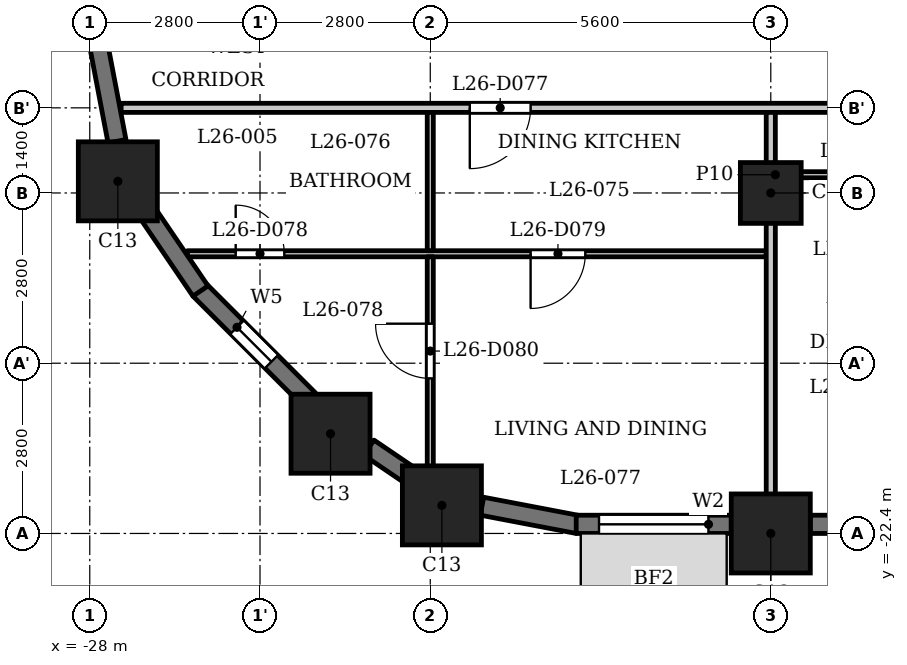
"""IFC4 building model, lengths in metres.
Left out: names, types, materials, properties, quantities, classifications, styles, units other than length and angle.
Written with IfcOpenShell. Run it as: python <this file> out.ifc"""

import sys

from ifc_helpers import new_model, si_unit, direction, frame, frame_2d, origin, origin_2d, place, context, subcontext, project, spatial, rectangle, extrude, element, fill, save


model = new_model("IFC4")
c1 = context("Model", 3, precision=1e-05, world=origin(), true_north=direction((0.0, 1.0)))
c2 = subcontext(c1, "Body", "Model", "MODEL_VIEW")
j1 = project(units=[si_unit("LENGTHUNIT", "METRE"), si_unit("PLANEANGLEUNIT", "RADIAN")], contexts=[c1])
p1 = place(None, origin())
s1 = spatial("IfcSite", under=j1, at=p1, CompositionType="ELEMENT")
p2 = place(p1, origin())
s2 = spatial("IfcBuilding", under=s1, at=p2, CompositionType="ELEMENT")
p3 = place(p2, frame((0.0, 0.0, 104.3)))
s3 = spatial("IfcBuildingStorey", under=s2, at=p3, CompositionType="ELEMENT", Elevation=104.3)
for number, where, z_axis, x_axis in (
    (1, (-22.209, -21.938, 0.0), (0.0, 0.0, 1.0), (1.0, 0.0, 0.0)),
    (2, (-16.8, -22.4, 0.0), (0.0, 0.0, 1.0), (1.0, 0.0, 0.0)),
    (3, (-27.538, -16.609, 0.0), (0.0, 0.0, 1.0), (1.0, 0.0, 0.0)),
    (4, (-24.04, -20.76, 0.0), (0.0, 0.0, 1.0), (1.0, 0.0, 0.0)),
):
    element("IfcColumn", number, at=place(p3, frame(where, z_axis=z_axis, x_axis=x_axis)), inside=s3, PredefinedType="COLUMN", context=c2, shape_type="SweptSolid", body=[
        extrude(rectangle(XDim=1.3, YDim=1.3, at=origin_2d()), origin(), (0.0, 0.0, 1.0), 3.5),
    ])
p4 = place(p3, frame((-16.8, -16.8, 0.0), z_axis=(0.0, 0.0, 1.0), x_axis=(1.0, 0.0, 0.0)))
e5 = element("IfcColumn", 5, at=p4, inside=s3, PredefinedType="COLUMN", context=c2, shape_type="SweptSolid", body=[
    extrude(rectangle(XDim=1.0, YDim=1.0, at=origin_2d()), origin(), (0.0, 0.0, 1.0), 3.5),
])
p5 = place(p3, frame((-26.197, -18.391, 0.0), z_axis=(0.0, 0.0, 1.0), x_axis=(0.707058908279, -0.707154650853, 0.0)))
e6 = element("IfcWall", 6, at=p5, inside=s3, PredefinedType="SOLIDWALL", context=c2, shape_type="SweptSolid", body=[
    extrude(rectangle(XDim=2.55, YDim=0.3, at=frame_2d((1.275, 0.0))), origin(), (0.0, 0.0, 1.0), 2.4),
])
p6 = place(p5, frame((0.875, 0.0, 0.6)))
e7 = element("IfcOpeningElement", 7, at=p6, cuts=e6, PredefinedType="OPENING", context=c2, shape_type="SweptSolid", body=[
    extrude(rectangle(XDim=0.8, YDim=1.55, at=frame_2d((0.4, 0.775))), frame((0.0, 0.16, 0.0), z_axis=(0.0, -1.0, 0.0), x_axis=(1.0, 0.0, 0.0)), (0.0, 0.0, 1.0), 0.32),
])
p7 = place(p3, frame((-23.41, -20.989, 0.0), z_axis=(0.0, 0.0, 1.0), x_axis=(0.827050703543, -0.562127328787, 0.0)))
e8 = element("IfcWall", 8, at=p7, inside=s3, PredefinedType="SOLIDWALL", context=c2, shape_type="SweptSolid", body=[
    extrude(rectangle(XDim=0.877, YDim=0.3, at=frame_2d((0.438, 0.0))), origin(), (0.0, 0.0, 1.0), 3.2),
])
p8 = place(p3, frame((-21.55, -21.952, 0.0), z_axis=(0.0, 0.0, 1.0), x_axis=(0.982278644094, -0.187426426519, 0.0)))
e9 = element("IfcWall", 9, at=p8, inside=s3, PredefinedType="SOLIDWALL", context=c2, shape_type="SweptSolid", body=[
    extrude(rectangle(XDim=1.606, YDim=0.3, at=frame_2d((0.803, 0.0))), origin(), (0.0, 0.0, 1.0), 2.4),
])
p9 = place(p3, frame((-20.0, -22.25, 0.0), z_axis=(0.0, 0.0, 1.0), x_axis=(1.0, 0.0, 0.0)))
e10 = element("IfcWall", 10, at=p9, inside=s3, PredefinedType="SOLIDWALL", context=c2, shape_type="SweptSolid", body=[
    extrude(rectangle(XDim=2.55, YDim=0.3, at=frame_2d((1.275, 0.0))), origin(), (0.0, 0.0, 1.0), 2.4),
])
p10 = place(p9, frame((0.375, 0.0, 0.9)))
e11 = element("IfcOpeningElement", 11, at=p10, cuts=e10, PredefinedType="OPENING", context=c2, shape_type="SweptSolid", body=[
    extrude(rectangle(XDim=1.8, YDim=1.25, at=frame_2d((0.9, 0.625))), frame((0.0, 0.16, 0.0), z_axis=(0.0, -1.0, 0.0), x_axis=(1.0, 0.0, 0.0)), (0.0, 0.0, 1.0), 0.32),
])
p11 = place(p3, frame((-16.15, -22.25, 0.0), z_axis=(0.0, 0.0, 1.0), x_axis=(1.0, 0.0, 0.0)))
e12 = element("IfcWall", 12, at=p11, inside=s3, PredefinedType="SOLIDWALL", context=c2, shape_type="SweptSolid", body=[
    extrude(rectangle(XDim=4.3, YDim=0.3, at=frame_2d((2.15, 0.0))), origin(), (0.0, 0.0, 1.0), 2.4),
])
p12 = place(p11, frame((0.337, 0.0, 0.6)))
e13 = element("IfcOpeningElement", 13, at=p12, cuts=e12, PredefinedType="OPENING", context=c2, shape_type="SweptSolid", body=[
    extrude(rectangle(XDim=1.2, YDim=1.55, at=frame_2d((0.6, 0.775))), frame((0.0, 0.16, 0.0), z_axis=(0.0, -1.0, 0.0), x_axis=(1.0, 0.0, 0.0)), (0.0, 0.0, 1.0), 0.32),
])
p13 = place(p11, frame((2.562, 0.0, 0.6)))
e14 = element("IfcOpeningElement", 14, at=p13, cuts=e12, PredefinedType="OPENING", context=c2, shape_type="SweptSolid", body=[
    extrude(rectangle(XDim=1.2, YDim=1.55, at=frame_2d((0.6, 0.775))), frame((0.0, 0.16, 0.0), z_axis=(0.0, -1.0, 0.0), x_axis=(1.0, 0.0, 0.0)), (0.0, 0.0, 1.0), 0.32),
])
for number, where, z_axis, x_axis in (
    (15, (-27.853, -14.372, 0.0), (0.0, 0.0, 1.0), (0.187, -0.982, 0.0)),
    (16, (-27.082, -17.084, 0.0), (0.0, 0.0, 1.0), (0.562, -0.827, 0.0)),
):
    element("IfcWall", number, at=place(p3, frame(where, z_axis=z_axis, x_axis=x_axis)), inside=s3, PredefinedType="SOLIDWALL", context=c2, shape_type="SweptSolid", body=[
        extrude(rectangle(XDim=1.606, YDim=0.3, at=frame_2d((0.803, 0.0))), origin(), (0.0, 0.0, 1.0), 2.4),
    ])
p14 = place(p3, frame((-26.394, -17.8, 0.0), z_axis=(0.0, 0.0, 1.0), x_axis=(1.0, 0.0, 0.0)))
e17 = element("IfcWall", 17, at=p14, inside=s3, PredefinedType="PARTITIONING", context=c2, shape_type="SweptSolid", body=[
    extrude(rectangle(XDim=9.519, YDim=0.1, at=frame_2d((4.76, 0.0))), origin(), (0.0, 0.0, 1.0), 3.2),
])
p15 = place(p14, frame((0.794, 0.0, 0.0)))
e18 = element("IfcOpeningElement", 18, at=p15, cuts=e17, PredefinedType="OPENING", context=c2, shape_type="SweptSolid", body=[
    extrude(rectangle(XDim=0.8, YDim=2.1, at=frame_2d((0.4, 1.05))), frame((0.0, 0.06, 0.0), z_axis=(0.0, -1.0, 0.0), x_axis=(1.0, 0.0, 0.0)), (0.0, 0.0, 1.0), 0.12),
])
p16 = place(p14, frame((5.644, 0.0, 0.0)))
e19 = element("IfcOpeningElement", 19, at=p16, cuts=e17, PredefinedType="OPENING", context=c2, shape_type="SweptSolid", body=[
    extrude(rectangle(XDim=0.9, YDim=2.1, at=frame_2d((0.45, 1.05))), frame((0.0, 0.06, 0.0), z_axis=(0.0, -1.0, 0.0), x_axis=(1.0, 0.0, 0.0)), (0.0, 0.0, 1.0), 0.12),
])
p17 = place(p3, frame((-16.725, -16.5, 0.0), z_axis=(0.0, 0.0, 1.0), x_axis=(1.0, 0.0, 0.0)))
e20 = element("IfcWall", 20, at=p17, inside=s3, PredefinedType="PARTITIONING", context=c2, shape_type="SweptSolid", body=[
    extrude(rectangle(XDim=33.45, YDim=0.1, at=frame_2d((16.725, 0.0))), origin(), (0.0, 0.0, 1.0), 3.2),
])
p18 = place(p17, frame((4.075, 0.0, 0.0)))
e21 = element("IfcOpeningElement", 21, at=p18, cuts=e20, PredefinedType="OPENING", context=c2, shape_type="SweptSolid", body=[
    extrude(rectangle(XDim=0.8, YDim=2.1, at=frame_2d((0.4, 1.05))), frame((0.0, 0.06, 0.0), z_axis=(0.0, -1.0, 0.0), x_axis=(1.0, 0.0, 0.0)), (0.0, 0.0, 1.0), 0.12),
])
p19 = place(p17, frame((1.075, 0.0, 0.0)))
e22 = element("IfcOpeningElement", 22, at=p19, cuts=e20, PredefinedType="OPENING", context=c2, shape_type="SweptSolid", body=[
    extrude(rectangle(XDim=0.9, YDim=2.1, at=frame_2d((0.45, 1.05))), frame((0.0, 0.06, 0.0), z_axis=(0.0, -1.0, 0.0), x_axis=(1.0, 0.0, 0.0)), (0.0, 0.0, 1.0), 0.12),
])
p20 = place(p17, frame((9.675, 0.0, 0.0)))
e23 = element("IfcOpeningElement", 23, at=p20, cuts=e20, PredefinedType="OPENING", context=c2, shape_type="SweptSolid", body=[
    extrude(rectangle(XDim=0.8, YDim=2.1, at=frame_2d((0.4, 1.05))), frame((0.0, 0.06, 0.0), z_axis=(0.0, -1.0, 0.0), x_axis=(1.0, 0.0, 0.0)), (0.0, 0.0, 1.0), 0.12),
])
p21 = place(p17, frame((7.675, 0.0, 0.0)))
e24 = element("IfcOpeningElement", 24, at=p21, cuts=e20, PredefinedType="OPENING", context=c2, shape_type="SweptSolid", body=[
    extrude(rectangle(XDim=0.9, YDim=2.1, at=frame_2d((0.45, 1.05))), frame((0.0, 0.06, 0.0), z_axis=(0.0, -1.0, 0.0), x_axis=(1.0, 0.0, 0.0)), (0.0, 0.0, 1.0), 0.12),
])
p22 = place(p17, frame((15.275, 0.0, 0.0)))
e25 = element("IfcOpeningElement", 25, at=p22, cuts=e20, PredefinedType="OPENING", context=c2, shape_type="SweptSolid", body=[
    extrude(rectangle(XDim=0.8, YDim=2.1, at=frame_2d((0.4, 1.05))), frame((0.0, 0.06, 0.0), z_axis=(0.0, -1.0, 0.0), x_axis=(1.0, 0.0, 0.0)), (0.0, 0.0, 1.0), 0.12),
])
p23 = place(p17, frame((11.775, 0.0, 0.0)))
e26 = element("IfcOpeningElement", 26, at=p23, cuts=e20, PredefinedType="OPENING", context=c2, shape_type="SweptSolid", body=[
    extrude(rectangle(XDim=0.9, YDim=2.1, at=frame_2d((0.45, 1.05))), frame((0.0, 0.06, 0.0), z_axis=(0.0, -1.0, 0.0), x_axis=(1.0, 0.0, 0.0)), (0.0, 0.0, 1.0), 0.12),
])
p24 = place(p17, frame((20.625, 0.0, 0.0)))
e27 = element("IfcOpeningElement", 27, at=p24, cuts=e20, PredefinedType="OPENING", context=c2, shape_type="SweptSolid", body=[
    extrude(rectangle(XDim=0.8, YDim=2.1, at=frame_2d((0.4, 1.05))), frame((0.0, 0.06, 0.0), z_axis=(0.0, -1.0, 0.0), x_axis=(1.0, 0.0, 0.0)), (0.0, 0.0, 1.0), 0.12),
])
p25 = place(p17, frame((18.375, 0.0, 0.0)))
e28 = element("IfcOpeningElement", 28, at=p25, cuts=e20, PredefinedType="OPENING", context=c2, shape_type="SweptSolid", body=[
    extrude(rectangle(XDim=0.9, YDim=2.1, at=frame_2d((0.45, 1.05))), frame((0.0, 0.06, 0.0), z_axis=(0.0, -1.0, 0.0), x_axis=(1.0, 0.0, 0.0)), (0.0, 0.0, 1.0), 0.12),
])
p26 = place(p17, frame((26.475, 0.0, 0.0)))
e29 = element("IfcOpeningElement", 29, at=p26, cuts=e20, PredefinedType="OPENING", context=c2, shape_type="SweptSolid", body=[
    extrude(rectangle(XDim=0.8, YDim=2.1, at=frame_2d((0.4, 1.05))), frame((0.0, 0.06, 0.0), z_axis=(0.0, -1.0, 0.0), x_axis=(1.0, 0.0, 0.0)), (0.0, 0.0, 1.0), 0.12),
])
p27 = place(p17, frame((23.225, 0.0, 0.0)))
e30 = element("IfcOpeningElement", 30, at=p27, cuts=e20, PredefinedType="OPENING", context=c2, shape_type="SweptSolid", body=[
    extrude(rectangle(XDim=0.9, YDim=2.1, at=frame_2d((0.45, 1.05))), frame((0.0, 0.06, 0.0), z_axis=(0.0, -1.0, 0.0), x_axis=(1.0, 0.0, 0.0)), (0.0, 0.0, 1.0), 0.12),
])
p28 = place(p17, frame((29.475, 0.0, 0.0)))
e31 = element("IfcOpeningElement", 31, at=p28, cuts=e20, PredefinedType="OPENING", context=c2, shape_type="SweptSolid", body=[
    extrude(rectangle(XDim=0.8, YDim=2.1, at=frame_2d((0.4, 1.05))), frame((0.0, 0.06, 0.0), z_axis=(0.0, -1.0, 0.0), x_axis=(1.0, 0.0, 0.0)), (0.0, 0.0, 1.0), 0.12),
])
p29 = place(p17, frame((31.825, 0.0, 0.0)))
e32 = element("IfcOpeningElement", 32, at=p29, cuts=e20, PredefinedType="OPENING", context=c2, shape_type="SweptSolid", body=[
    extrude(rectangle(XDim=0.9, YDim=2.1, at=frame_2d((0.45, 1.05))), frame((0.0, 0.06, 0.0), z_axis=(0.0, -1.0, 0.0), x_axis=(1.0, 0.0, 0.0)), (0.0, 0.0, 1.0), 0.12),
])
p30 = place(p3, frame((-27.484, -15.4, 0.0), z_axis=(0.0, 0.0, 1.0), x_axis=(1.0, 0.0, 0.0)))
e33 = element("IfcWall", 33, at=p30, inside=s3, PredefinedType="PARTITIONING", context=c2, shape_type="SweptSolid", body=[
    extrude(rectangle(XDim=12.559, YDim=0.15, at=frame_2d((6.279, 0.0))), origin(), (0.0, 0.0, 1.0), 3.2),
])
p31 = place(p30, frame((5.734, 0.0, 0.0)))
e34 = element("IfcOpeningElement", 34, at=p31, cuts=e33, PredefinedType="OPENING", context=c2, shape_type="SweptSolid", body=[
    extrude(rectangle(XDim=1.0, YDim=2.1, at=frame_2d((0.5, 1.05))), frame((0.0, 0.085, 0.0), z_axis=(0.0, -1.0, 0.0), x_axis=(1.0, 0.0, 0.0)), (0.0, 0.0, 1.0), 0.17),
])
p32 = place(p3, frame((-22.4, -21.72, 0.0), z_axis=(0.0, 0.0, 1.0), x_axis=(0.0, 1.0, 0.0)))
e35 = element("IfcWall", 35, at=p32, inside=s3, PredefinedType="PARTITIONING", context=c2, shape_type="SweptSolid", body=[
    extrude(rectangle(XDim=3.87, YDim=0.1, at=frame_2d((1.935, 0.0))), origin(), (0.0, 0.0, 1.0), 3.2),
])
p33 = place(p32, frame((1.87, 0.0, 0.0)))
e36 = element("IfcOpeningElement", 36, at=p33, cuts=e35, PredefinedType="OPENING", context=c2, shape_type="SweptSolid", body=[
    extrude(rectangle(XDim=0.9, YDim=2.1, at=frame_2d((0.45, 1.05))), frame((0.0, 0.06, 0.0), z_axis=(0.0, -1.0, 0.0), x_axis=(1.0, 0.0, 0.0)), (0.0, 0.0, 1.0), 0.12),
])
p34 = place(p3, frame((-22.4, -17.75, 0.0), z_axis=(0.0, 0.0, 1.0), x_axis=(0.0, 1.0, 0.0)))
e37 = element("IfcWall", 37, at=p34, inside=s3, PredefinedType="PARTITIONING", context=c2, shape_type="SweptSolid", body=[
    extrude(rectangle(XDim=2.275, YDim=0.1, at=frame_2d((1.137, 0.0))), origin(), (0.0, 0.0, 1.0), 3.2),
])
p35 = place(p3, frame((-16.8, -23.03, 0.0), z_axis=(0.0, 0.0, 1.0), x_axis=(0.0, 1.0, 0.0)))
e38 = element("IfcWall", 38, at=p35, inside=s3, PredefinedType="PARTITIONING", context=c2, shape_type="SweptSolid", body=[
    extrude(rectangle(XDim=7.555, YDim=0.15, at=frame_2d((3.777, 0.0))), origin(), (0.0, 0.0, 1.0), 3.2),
])
p36 = place(p31, origin())
e39 = element("IfcDoor", 39, at=p36, inside=s3, OperationType="SINGLE_SWING_LEFT", PredefinedType="DOOR", context=c2, shape_type="SweptSolid", body=[
    extrude(rectangle(XDim=1.0, YDim=2.1, at=frame_2d((0.5, 1.05))), frame((0.0, 0.025, 0.0), z_axis=(0.0, -1.0, 0.0), x_axis=(1.0, 0.0, 0.0)), (0.0, 0.0, 1.0), 0.05),
])
fill(e34, e39)
p37 = place(p15, origin())
e40 = element("IfcDoor", 40, at=p37, inside=s3, OperationType="SINGLE_SWING_RIGHT", PredefinedType="DOOR", context=c2, shape_type="SweptSolid", body=[
    extrude(rectangle(XDim=0.8, YDim=2.1, at=frame_2d((0.4, 1.05))), frame((0.0, 0.025, 0.0), z_axis=(0.0, -1.0, 0.0), x_axis=(1.0, 0.0, 0.0)), (0.0, 0.0, 1.0), 0.05),
])
fill(e18, e40)
p38 = place(p16, origin())
e41 = element("IfcDoor", 41, at=p38, inside=s3, OperationType="SINGLE_SWING_LEFT", PredefinedType="DOOR", context=c2, shape_type="SweptSolid", body=[
    extrude(rectangle(XDim=0.9, YDim=2.1, at=frame_2d((0.45, 1.05))), frame((0.0, 0.025, 0.0), z_axis=(0.0, -1.0, 0.0), x_axis=(1.0, 0.0, 0.0)), (0.0, 0.0, 1.0), 0.05),
])
fill(e19, e41)
p39 = place(p33, origin())
e42 = element("IfcDoor", 42, at=p39, inside=s3, OperationType="SINGLE_SWING_LEFT", PredefinedType="DOOR", context=c2, shape_type="SweptSolid", body=[
    extrude(rectangle(XDim=0.9, YDim=2.1, at=frame_2d((0.45, 1.05))), frame((0.0, 0.025, 0.0), z_axis=(0.0, -1.0, 0.0), x_axis=(1.0, 0.0, 0.0)), (0.0, 0.0, 1.0), 0.05),
])
fill(e36, e42)
p40 = place(p6, origin())
e43 = element("IfcWindow", 43, at=p40, inside=s3, PartitioningType="SINGLE_PANEL", PredefinedType="WINDOW", context=c2, shape_type="SweptSolid", body=[
    extrude(rectangle(XDim=0.8, YDim=1.55, at=frame_2d((0.4, 0.775))), frame((0.0, 0.03, 0.0), z_axis=(0.0, -1.0, 0.0), x_axis=(1.0, 0.0, 0.0)), (0.0, 0.0, 1.0), 0.06),
])
fill(e7, e43)
p41 = place(p10, origin())
e44 = element("IfcWindow", 44, at=p41, inside=s3, PartitioningType="SINGLE_PANEL", PredefinedType="WINDOW", context=c2, shape_type="SweptSolid", body=[
    extrude(rectangle(XDim=1.8, YDim=1.25, at=frame_2d((0.9, 0.625))), frame((0.0, 0.03, 0.0), z_axis=(0.0, -1.0, 0.0), x_axis=(1.0, 0.0, 0.0)), (0.0, 0.0, 1.0), 0.06),
])
fill(e11, e44)
save(model, sys.argv[1])
